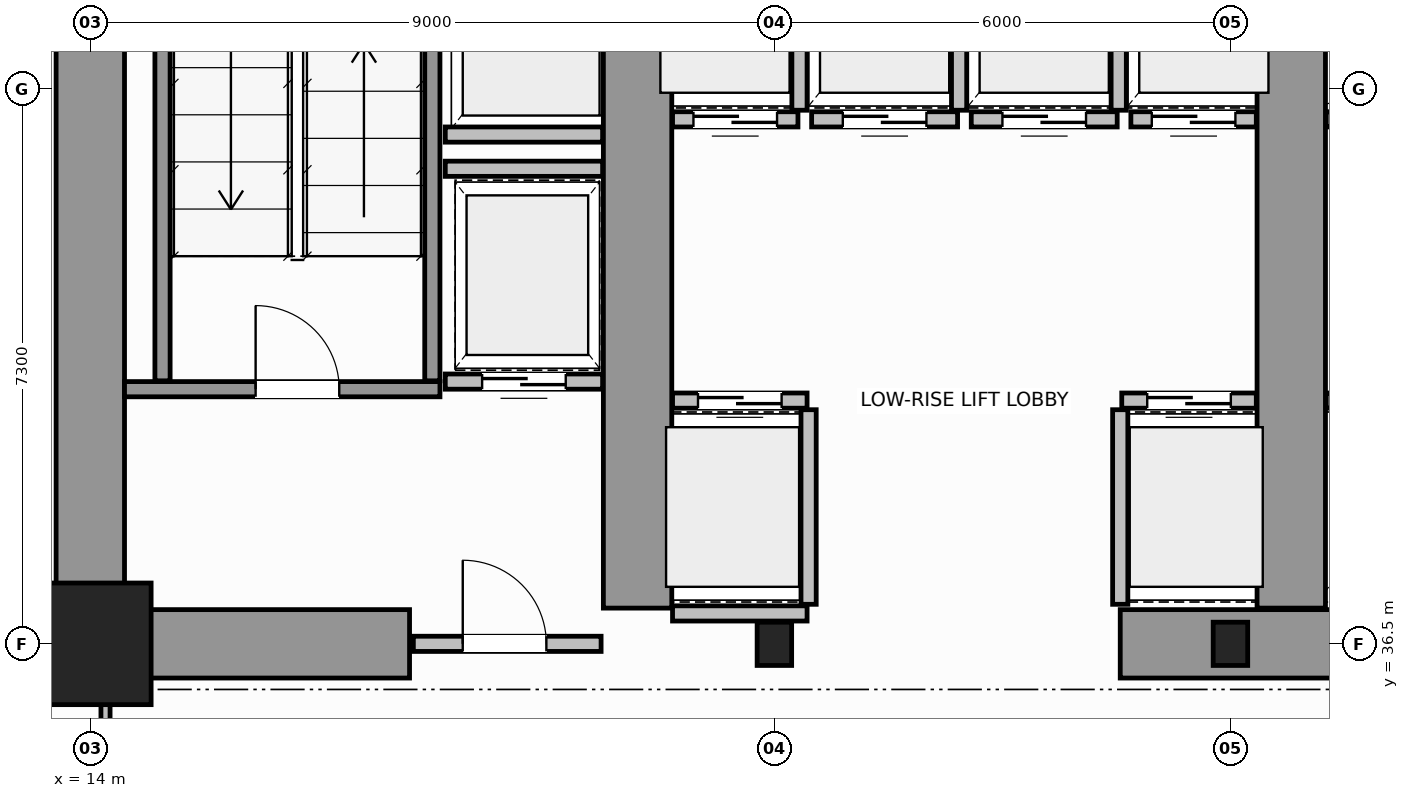
"""IFC4 building model, lengths in metres.
Left out: names, types, materials, properties, quantities, classifications, styles, units other than length and angle.
Written with IfcOpenShell. Run it as: python <this file> out.ifc"""

import sys

from ifc_helpers import new_model, si_unit, direction, frame, frame_2d, origin, origin_2d, place, context, subcontext, project, spatial, rectangle, i_section, extrude, source, transform, mapped, element, fill, save


model = new_model("IFC4")
c1 = context("Model", 3, precision=1e-05, world=origin(), true_north=direction((0.0, 1.0)))
c2 = subcontext(c1, "Body", "Model", "MODEL_VIEW")
j1 = project(units=[si_unit("LENGTHUNIT", "METRE"), si_unit("PLANEANGLEUNIT", "RADIAN")], contexts=[c1])
p1 = place(None, origin())
s1 = spatial("IfcSite", under=j1, at=p1, CompositionType="ELEMENT")
p2 = place(p1, origin())
s2 = spatial("IfcBuilding", under=s1, at=p2, CompositionType="ELEMENT")
p3 = place(p2, frame((0.0, 0.0, 18.8)))
s3 = spatial("IfcBuildingStorey", under=s2, at=p3, CompositionType="ELEMENT", Elevation=18.8)
m1 = source(origin(), c2, "Body", "SweptSolid", [
    extrude(rectangle(XDim=1.6, YDim=1.6, at=origin_2d()), origin(), (0.0, 0.0, 1.0), 3.8),
])
p4 = place(p3, frame((14.0, 36.5, 0.0), z_axis=(0.0, 0.0, 1.0), x_axis=(1.0, 0.0, 0.0)))
e1 = element("IfcColumn", 1, at=p4, inside=s3, PredefinedType="COLUMN", context=c2, shape_type="MappedRepresentation", body=[
    mapped(m1, transform((0.0, 0.0, 0.0), scale=1.0)),
])
m2 = source(origin(), c2, "Body", "SweptSolid", [
    extrude(i_section(OverallWidth=0.454, OverallDepth=0.569, WebThickness=0.078, FlangeThickness=0.08, FilletRadius=0.015, at=origin_2d()), origin(), (0.0, 0.0, 1.0), 3.8),
])
for number, where, z_axis, x_axis in (
    (2, (23.0, 36.5, 0.0), (0.0, 0.0, 1.0), (1.0, 0.0, 0.0)),
    (3, (29.0, 36.5, 0.0), (0.0, 0.0, 1.0), (1.0, 0.0, 0.0)),
):
    element("IfcColumn", number, at=place(p3, frame(where, z_axis=z_axis, x_axis=x_axis)), inside=s3, PredefinedType="COLUMN", context=c2, shape_type="MappedRepresentation", body=[
        mapped(m2, transform((0.0, 0.0, 0.0), scale=1.0)),
    ])
p5 = place(p3, frame((14.0, 36.5, 0.0), z_axis=(0.0, 0.0, 1.0), x_axis=(0.0, 1.0, 0.0)))
e4 = element("IfcWall", 4, at=p5, inside=s3, PredefinedType="SHEAR", context=c2, shape_type="SweptSolid", body=[
    extrude(rectangle(XDim=14.5, YDim=0.9, at=frame_2d((7.25, 0.0))), origin(), (0.0, 0.0, 1.0), 3.8),
])
p6 = place(p3, frame((14.47, 36.5, 0.0), z_axis=(0.0, 0.0, 1.0), x_axis=(1.0, 0.0, 0.0)))
e5 = element("IfcWall", 5, at=p6, inside=s3, PredefinedType="SHEAR", context=c2, shape_type="SweptSolid", body=[
    extrude(rectangle(XDim=3.73, YDim=0.9, at=frame_2d((1.865, 0.0))), origin(), (0.0, 0.0, 1.0), 2.38),
])
p7 = place(p3, frame((27.55, 36.5, 0.0), z_axis=(0.0, 0.0, 1.0), x_axis=(1.0, 0.0, 0.0)))
e6 = element("IfcWall", 6, at=p7, inside=s3, PredefinedType="SHEAR", context=c2, shape_type="SweptSolid", body=[
    extrude(rectangle(XDim=4.5, YDim=0.9, at=frame_2d((2.25, 0.0))), origin(), (0.0, 0.0, 1.0), 3.8),
])
for number, where, z_axis, x_axis in (
    (7, (21.2, 36.97, 0.0), (0.0, 0.0, 1.0), (0.0, 1.0, 0.0)),
    (8, (29.8, 36.97, 0.0), (0.0, 0.0, 1.0), (0.0, 1.0, 0.0)),
):
    element("IfcWall", number, at=place(p3, frame(where, z_axis=z_axis, x_axis=x_axis)), inside=s3, PredefinedType="SHEAR", context=c2, shape_type="SweptSolid", body=[
        extrude(rectangle(XDim=9.23, YDim=0.9, at=frame_2d((4.615, 0.0))), origin(), (0.0, 0.0, 1.0), 3.8),
    ])
p8 = place(p3, frame((14.45, 39.85, 0.0), z_axis=(0.0, 0.0, 1.0), x_axis=(1.0, 0.0, 0.0)))
e9 = element("IfcWall", 9, at=p8, inside=s3, PredefinedType="SOLIDWALL", context=c2, shape_type="SweptSolid", body=[
    extrude(rectangle(XDim=4.15, YDim=0.2, at=frame_2d((2.075, 0.0))), origin(), (0.0, 0.0, 1.0), 3.8),
])
p9 = place(p8, frame((1.725, 0.0, 0.0)))
e10 = element("IfcOpeningElement", 10, at=p9, cuts=e9, PredefinedType="OPENING", context=c2, shape_type="SweptSolid", body=[
    extrude(rectangle(XDim=1.1, YDim=2.15, at=frame_2d((0.55, 1.075))), frame((0.0, 0.11, 0.0), z_axis=(0.0, -1.0, 0.0), x_axis=(1.0, 0.0, 0.0)), (0.0, 0.0, 1.0), 0.22),
])
for number, where, z_axis, x_axis in (
    (11, (14.95, 39.96, 0.0), (0.0, 0.0, 1.0), (0.0, 1.0, 0.0)),
    (12, (18.5, 39.96, 0.0), (0.0, 0.0, 1.0), (0.0, 1.0, 0.0)),
):
    element("IfcWall", number, at=place(p3, frame(where, z_axis=z_axis, x_axis=x_axis)), inside=s3, PredefinedType="SOLIDWALL", context=c2, shape_type="SweptSolid", body=[
        extrude(rectangle(XDim=9.93, YDim=0.2, at=frame_2d((4.965, 0.0))), origin(), (0.0, 0.0, 1.0), 3.8),
    ])
p10 = place(p3, frame((18.25, 36.5, 0.0), z_axis=(0.0, 0.0, 1.0), x_axis=(1.0, 0.0, 0.0)))
e13 = element("IfcWall", 13, at=p10, inside=s3, PredefinedType="SOLIDWALL", context=c2, shape_type="SweptSolid", body=[
    extrude(rectangle(XDim=2.47, YDim=0.2, at=frame_2d((1.235, 0.0))), origin(), (0.0, 0.0, 1.0), 2.37),
])
p11 = place(p10, frame((0.65, 0.0, 0.0)))
e14 = element("IfcOpeningElement", 14, at=p11, cuts=e13, PredefinedType="OPENING", context=c2, shape_type="SweptSolid", body=[
    extrude(rectangle(XDim=1.1, YDim=2.15, at=frame_2d((0.55, 1.075))), frame((0.0, 0.11, 0.0), z_axis=(0.0, -1.0, 0.0), x_axis=(1.0, 0.0, 0.0)), (0.0, 0.0, 1.0), 0.22),
])
p12 = place(p3, frame((21.66, 39.7, 0.0), z_axis=(0.0, 0.0, 1.0), x_axis=(1.0, 0.0, 0.0)))
e15 = element("IfcWall", 15, at=p12, inside=s3, PredefinedType="SOLIDWALL", context=c2, shape_type="SweptSolid", body=[
    extrude(rectangle(XDim=1.77, YDim=0.2, at=frame_2d((0.885, 0.0))), origin(), (0.0, 0.0, 1.0), 3.58),
])
p13 = place(p12, frame((0.335, 0.0, 0.0)))
e16 = element("IfcOpeningElement", 16, at=p13, cuts=e15, PredefinedType="OPENING", context=c2, shape_type="SweptSolid", body=[
    extrude(rectangle(XDim=1.1, YDim=2.15, at=frame_2d((0.55, 1.075))), frame((0.0, 0.11, 0.0), z_axis=(0.0, -1.0, 0.0), x_axis=(1.0, 0.0, 0.0)), (0.0, 0.0, 1.0), 0.22),
])
p14 = place(p3, frame((21.66, 36.9, 0.0), z_axis=(0.0, 0.0, 1.0), x_axis=(1.0, 0.0, 0.0)))
e17 = element("IfcWall", 17, at=p14, inside=s3, PredefinedType="SOLIDWALL", context=c2, shape_type="SweptSolid", body=[
    extrude(rectangle(XDim=1.77, YDim=0.2, at=frame_2d((0.885, 0.0))), origin(), (0.0, 0.0, 1.0), 2.37),
])
p15 = place(p3, frame((23.45, 37.02, 0.0), z_axis=(0.0, 0.0, 1.0), x_axis=(0.0, 1.0, 0.0)))
e18 = element("IfcWall", 18, at=p15, inside=s3, PredefinedType="SOLIDWALL", context=c2, shape_type="SweptSolid", body=[
    extrude(rectangle(XDim=2.56, YDim=0.2, at=frame_2d((1.28, 0.0))), origin(), (0.0, 0.0, 1.0), 3.58),
])
p16 = place(p3, frame((27.57, 39.7, 0.0), z_axis=(0.0, 0.0, 1.0), x_axis=(1.0, 0.0, 0.0)))
e19 = element("IfcWall", 19, at=p16, inside=s3, PredefinedType="SOLIDWALL", context=c2, shape_type="SweptSolid", body=[
    extrude(rectangle(XDim=1.77, YDim=0.2, at=frame_2d((0.885, 0.0))), origin(), (0.0, 0.0, 1.0), 3.58),
])
p17 = place(p16, frame((0.335, 0.0, 0.0)))
e20 = element("IfcOpeningElement", 20, at=p17, cuts=e19, PredefinedType="OPENING", context=c2, shape_type="SweptSolid", body=[
    extrude(rectangle(XDim=1.1, YDim=2.15, at=frame_2d((0.55, 1.075))), frame((0.0, 0.11, 0.0), z_axis=(0.0, -1.0, 0.0), x_axis=(1.0, 0.0, 0.0)), (0.0, 0.0, 1.0), 0.22),
])
p18 = place(p3, frame((27.55, 37.02, 0.0), z_axis=(0.0, 0.0, 1.0), x_axis=(0.0, 1.0, 0.0)))
e21 = element("IfcWall", 21, at=p18, inside=s3, PredefinedType="SOLIDWALL", context=c2, shape_type="SweptSolid", body=[
    extrude(rectangle(XDim=2.56, YDim=0.2, at=frame_2d((1.28, 0.0))), origin(), (0.0, 0.0, 1.0), 3.58),
])
p19 = place(p3, frame((21.66, 43.4, 0.0), z_axis=(0.0, 0.0, 1.0), x_axis=(1.0, 0.0, 0.0)))
e22 = element("IfcWall", 22, at=p19, inside=s3, PredefinedType="SOLIDWALL", context=c2, shape_type="SweptSolid", body=[
    extrude(rectangle(XDim=1.65, YDim=0.2, at=frame_2d((0.825, 0.0))), origin(), (0.0, 0.0, 1.0), 3.58),
])
p20 = place(p19, frame((0.275, 0.0, 0.0)))
e23 = element("IfcOpeningElement", 23, at=p20, cuts=e22, PredefinedType="OPENING", context=c2, shape_type="SweptSolid", body=[
    extrude(rectangle(XDim=1.1, YDim=2.15, at=frame_2d((0.55, 1.075))), frame((0.0, 0.11, 0.0), z_axis=(0.0, -1.0, 0.0), x_axis=(1.0, 0.0, 0.0)), (0.0, 0.0, 1.0), 0.22),
])
p21 = place(p3, frame((23.33, 43.52, 0.0), z_axis=(0.0, 0.0, 1.0), x_axis=(0.0, 1.0, 0.0)))
e24 = element("IfcWall", 24, at=p21, inside=s3, PredefinedType="SOLIDWALL", context=c2, shape_type="SweptSolid", body=[
    extrude(rectangle(XDim=2.56, YDim=0.2, at=frame_2d((1.28, 0.0))), origin(), (0.0, 0.0, 1.0), 3.58),
])
p22 = place(p3, frame((23.49, 43.4, 0.0), z_axis=(0.0, 0.0, 1.0), x_axis=(1.0, 0.0, 0.0)))
e25 = element("IfcWall", 25, at=p22, inside=s3, PredefinedType="SOLIDWALL", context=c2, shape_type="SweptSolid", body=[
    extrude(rectangle(XDim=1.92, YDim=0.2, at=frame_2d((0.96, 0.0))), origin(), (0.0, 0.0, 1.0), 3.58),
])
p23 = place(p22, frame((0.41, 0.0, 0.0)))
e26 = element("IfcOpeningElement", 26, at=p23, cuts=e25, PredefinedType="OPENING", context=c2, shape_type="SweptSolid", body=[
    extrude(rectangle(XDim=1.1, YDim=2.15, at=frame_2d((0.55, 1.075))), frame((0.0, 0.11, 0.0), z_axis=(0.0, -1.0, 0.0), x_axis=(1.0, 0.0, 0.0)), (0.0, 0.0, 1.0), 0.22),
])
p24 = place(p3, frame((25.43, 43.52, 0.0), z_axis=(0.0, 0.0, 1.0), x_axis=(0.0, 1.0, 0.0)))
e27 = element("IfcWall", 27, at=p24, inside=s3, PredefinedType="SOLIDWALL", context=c2, shape_type="SweptSolid", body=[
    extrude(rectangle(XDim=2.56, YDim=0.2, at=frame_2d((1.28, 0.0))), origin(), (0.0, 0.0, 1.0), 3.58),
])
p25 = place(p3, frame((25.59, 43.4, 0.0), z_axis=(0.0, 0.0, 1.0), x_axis=(1.0, 0.0, 0.0)))
e28 = element("IfcWall", 28, at=p25, inside=s3, PredefinedType="SOLIDWALL", context=c2, shape_type="SweptSolid", body=[
    extrude(rectangle(XDim=1.92, YDim=0.2, at=frame_2d((0.96, 0.0))), origin(), (0.0, 0.0, 1.0), 3.58),
])
p26 = place(p25, frame((0.41, 0.0, 0.0)))
e29 = element("IfcOpeningElement", 29, at=p26, cuts=e28, PredefinedType="OPENING", context=c2, shape_type="SweptSolid", body=[
    extrude(rectangle(XDim=1.1, YDim=2.15, at=frame_2d((0.55, 1.075))), frame((0.0, 0.11, 0.0), z_axis=(0.0, -1.0, 0.0), x_axis=(1.0, 0.0, 0.0)), (0.0, 0.0, 1.0), 0.22),
])
p27 = place(p3, frame((27.53, 43.52, 0.0), z_axis=(0.0, 0.0, 1.0), x_axis=(0.0, 1.0, 0.0)))
e30 = element("IfcWall", 30, at=p27, inside=s3, PredefinedType="SOLIDWALL", context=c2, shape_type="SweptSolid", body=[
    extrude(rectangle(XDim=2.56, YDim=0.2, at=frame_2d((1.28, 0.0))), origin(), (0.0, 0.0, 1.0), 3.58),
])
p28 = place(p3, frame((27.69, 43.4, 0.0), z_axis=(0.0, 0.0, 1.0), x_axis=(1.0, 0.0, 0.0)))
e31 = element("IfcWall", 31, at=p28, inside=s3, PredefinedType="SOLIDWALL", context=c2, shape_type="SweptSolid", body=[
    extrude(rectangle(XDim=1.65, YDim=0.2, at=frame_2d((0.825, 0.0))), origin(), (0.0, 0.0, 1.0), 3.58),
])
p29 = place(p28, frame((0.275, 0.0, 0.0)))
e32 = element("IfcOpeningElement", 32, at=p29, cuts=e31, PredefinedType="OPENING", context=c2, shape_type="SweptSolid", body=[
    extrude(rectangle(XDim=1.1, YDim=2.15, at=frame_2d((0.55, 1.075))), frame((0.0, 0.11, 0.0), z_axis=(0.0, -1.0, 0.0), x_axis=(1.0, 0.0, 0.0)), (0.0, 0.0, 1.0), 0.22),
])
p30 = place(p3, frame((30.26, 39.7, 0.0), z_axis=(0.0, 0.0, 1.0), x_axis=(1.0, 0.0, 0.0)))
e33 = element("IfcWall", 33, at=p30, inside=s3, PredefinedType="SOLIDWALL", context=c2, shape_type="SweptSolid", body=[
    extrude(rectangle(XDim=1.77, YDim=0.2, at=frame_2d((0.885, 0.0))), origin(), (0.0, 0.0, 1.0), 3.58),
])
p31 = place(p3, frame((30.26, 43.4, 0.0), z_axis=(0.0, 0.0, 1.0), x_axis=(1.0, 0.0, 0.0)))
e34 = element("IfcWall", 34, at=p31, inside=s3, PredefinedType="SOLIDWALL", context=c2, shape_type="SweptSolid", body=[
    extrude(rectangle(XDim=1.65, YDim=0.2, at=frame_2d((0.825, 0.0))), origin(), (0.0, 0.0, 1.0), 3.58),
])
p32 = place(p3, frame((18.67, 43.2, 0.0), z_axis=(0.0, 0.0, 1.0), x_axis=(1.0, 0.0, 0.0)))
e35 = element("IfcWall", 35, at=p32, inside=s3, PredefinedType="SOLIDWALL", context=c2, shape_type="SweptSolid", body=[
    extrude(rectangle(XDim=2.07, YDim=0.2, at=frame_2d((1.035, 0.0))), origin(), (0.0, 0.0, 1.0), 3.58),
])
p33 = place(p3, frame((18.67, 39.95, 0.0), z_axis=(0.0, 0.0, 1.0), x_axis=(1.0, 0.0, 0.0)))
e36 = element("IfcWall", 36, at=p33, inside=s3, PredefinedType="SOLIDWALL", context=c2, shape_type="SweptSolid", body=[
    extrude(rectangle(XDim=2.07, YDim=0.2, at=frame_2d((1.035, 0.0))), origin(), (0.0, 0.0, 1.0), 3.58),
])
p34 = place(p33, frame((0.485, 0.0, 0.0)))
e37 = element("IfcOpeningElement", 37, at=p34, cuts=e36, PredefinedType="OPENING", context=c2, shape_type="SweptSolid", body=[
    extrude(rectangle(XDim=1.1, YDim=2.15, at=frame_2d((0.55, 1.075))), frame((0.0, 0.11, 0.0), z_axis=(0.0, -1.0, 0.0), x_axis=(1.0, 0.0, 0.0)), (0.0, 0.0, 1.0), 0.22),
])
p35 = place(p3, frame((18.67, 42.75, 0.0), z_axis=(0.0, 0.0, 1.0), x_axis=(1.0, 0.0, 0.0)))
e38 = element("IfcWall", 38, at=p35, inside=s3, PredefinedType="SOLIDWALL", context=c2, shape_type="SweptSolid", body=[
    extrude(rectangle(XDim=2.07, YDim=0.2, at=frame_2d((1.035, 0.0))), origin(), (0.0, 0.0, 1.0), 3.58),
])
p36 = place(p3, frame((14.2, 34.16, 0.0), z_axis=(0.0, 0.0, 1.0), x_axis=(0.0, 1.0, 0.0)))
e39 = element("IfcWall", 39, at=p36, inside=s3, PredefinedType="PARTITIONING", context=c2, shape_type="SweptSolid", body=[
    extrude(rectangle(XDim=2.28, YDim=0.12, at=frame_2d((1.14, 0.0))), origin(), (0.0, 0.0, 1.0), 3.58),
])
p37 = place(p36, frame((0.3, 0.0, 0.0)))
e40 = element("IfcOpeningElement", 40, at=p37, cuts=e39, PredefinedType="OPENING", context=c2, shape_type="SweptSolid", body=[
    extrude(rectangle(XDim=0.9, YDim=2.15, at=frame_2d((0.45, 1.075))), frame((0.0, 0.07, 0.0), z_axis=(0.0, -1.0, 0.0), x_axis=(1.0, 0.0, 0.0)), (0.0, 0.0, 1.0), 0.14),
])
m3 = source(origin(), c2, "Body", "SweptSolid", [
    extrude(rectangle(XDim=1.1, YDim=2.15, at=frame_2d((0.55, 1.075))), frame((0.0, 0.025, 0.0), z_axis=(0.0, -1.0, 0.0), x_axis=(1.0, 0.0, 0.0)), (0.0, 0.0, 1.0), 0.05),
])
p38 = place(p9, origin())
e41 = element("IfcDoor", 41, at=p38, inside=s3, OperationType="SINGLE_SWING_LEFT", PredefinedType="DOOR", context=c2, shape_type="MappedRepresentation", body=[
    mapped(m3, transform((0.0, 0.0, 0.0), scale=1.0)),
])
fill(e10, e41)
p39 = place(p11, origin())
e42 = element("IfcDoor", 42, at=p39, inside=s3, OperationType="SINGLE_SWING_RIGHT", PredefinedType="DOOR", context=c2, shape_type="MappedRepresentation", body=[
    mapped(m3, transform((0.0, 0.0, 0.0), scale=1.0)),
])
fill(e14, e42)
p40 = place(p13, origin())
e43 = element("IfcDoor", 43, at=p40, inside=s3, OperationType="DOUBLE_DOOR_SLIDING", PredefinedType="DOOR", context=c2, shape_type="MappedRepresentation", body=[
    mapped(m3, transform((0.0, 0.0, 0.0), scale=1.0)),
])
fill(e16, e43)
p41 = place(p17, origin())
e44 = element("IfcDoor", 44, at=p41, inside=s3, OperationType="DOUBLE_DOOR_SLIDING", PredefinedType="DOOR", context=c2, shape_type="MappedRepresentation", body=[
    mapped(m3, transform((0.0, 0.0, 0.0), scale=1.0)),
])
fill(e20, e44)
p42 = place(p20, origin())
e45 = element("IfcDoor", 45, at=p42, inside=s3, OperationType="DOUBLE_DOOR_SLIDING", PredefinedType="DOOR", context=c2, shape_type="MappedRepresentation", body=[
    mapped(m3, transform((0.0, 0.0, 0.0), scale=1.0)),
])
fill(e23, e45)
p43 = place(p23, origin())
e46 = element("IfcDoor", 46, at=p43, inside=s3, OperationType="DOUBLE_DOOR_SLIDING", PredefinedType="DOOR", context=c2, shape_type="MappedRepresentation", body=[
    mapped(m3, transform((0.0, 0.0, 0.0), scale=1.0)),
])
fill(e26, e46)
p44 = place(p26, origin())
e47 = element("IfcDoor", 47, at=p44, inside=s3, OperationType="DOUBLE_DOOR_SLIDING", PredefinedType="DOOR", context=c2, shape_type="MappedRepresentation", body=[
    mapped(m3, transform((0.0, 0.0, 0.0), scale=1.0)),
])
fill(e29, e47)
p45 = place(p29, origin())
e48 = element("IfcDoor", 48, at=p45, inside=s3, OperationType="DOUBLE_DOOR_SLIDING", PredefinedType="DOOR", context=c2, shape_type="MappedRepresentation", body=[
    mapped(m3, transform((0.0, 0.0, 0.0), scale=1.0)),
])
fill(e32, e48)
p46 = place(p34, origin())
e49 = element("IfcDoor", 49, at=p46, inside=s3, OperationType="DOUBLE_DOOR_SLIDING", PredefinedType="DOOR", context=c2, shape_type="MappedRepresentation", body=[
    mapped(m3, transform((0.0, 0.0, 0.0), scale=1.0)),
])
fill(e37, e49)
save(model, sys.argv[1])
